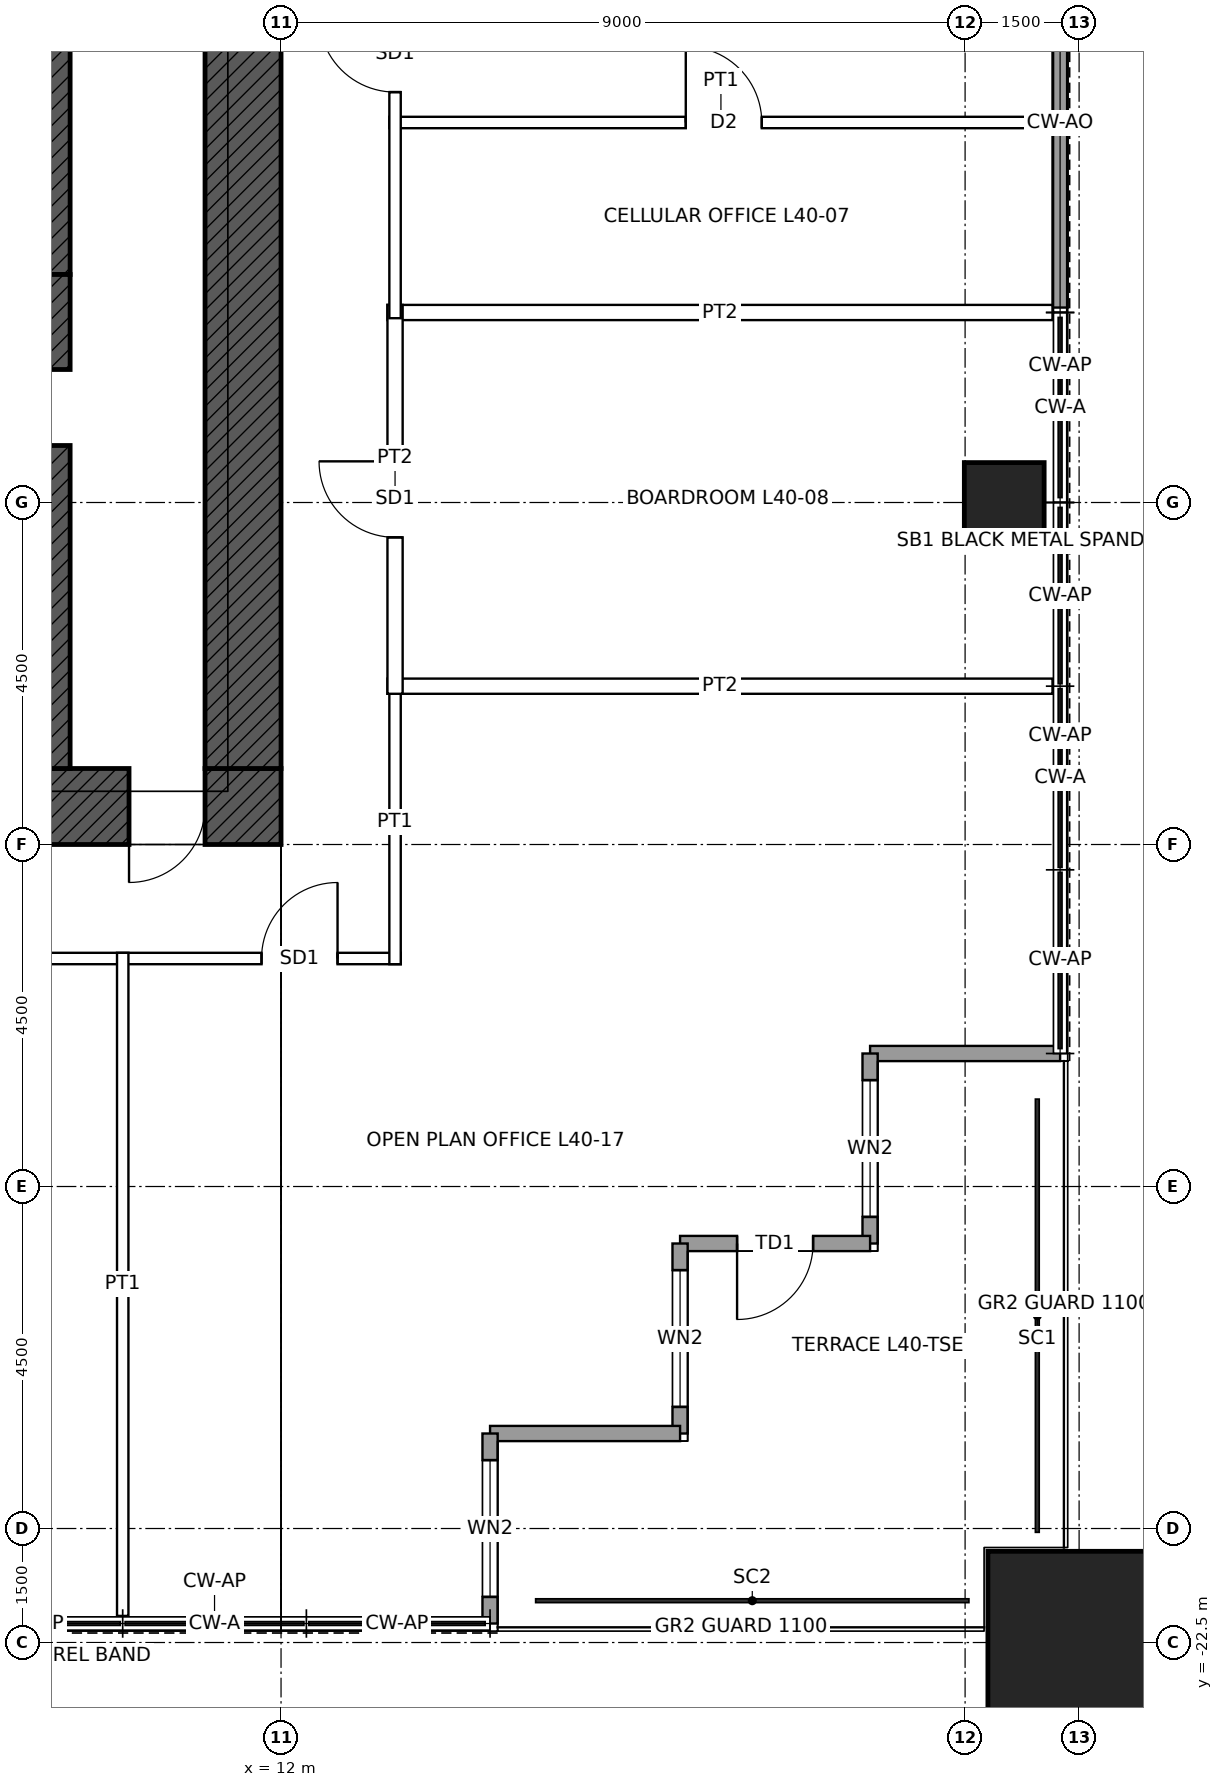
"""IFC4 building model, lengths in metres.
Left out: names, types, materials, properties, quantities, classifications, styles, units other than length and angle.
Written with IfcOpenShell. Run it as: python <this file> out.ifc"""

import sys

from ifc_helpers import new_model, si_unit, direction, frame, frame_2d, origin, origin_2d, place, context, subcontext, project, spatial, rectangle, hollow_rectangle, extrude, element, fill, save


model = new_model("IFC4")
c1 = context("Model", 3, precision=1e-05, world=origin(), true_north=direction((0.0, 1.0)))
c2 = subcontext(c1, "Body", "Model", "MODEL_VIEW")
j1 = project(units=[si_unit("LENGTHUNIT", "METRE"), si_unit("PLANEANGLEUNIT", "RADIAN")], contexts=[c1])
p1 = place(None, origin())
s1 = spatial("IfcSite", under=j1, at=p1, CompositionType="ELEMENT")
p2 = place(p1, origin())
s2 = spatial("IfcBuilding", under=s1, at=p2, CompositionType="ELEMENT")
p3 = place(p2, frame((0.0, 0.0, 193.9)))
s3 = spatial("IfcBuildingStorey", under=s2, at=p3, CompositionType="ELEMENT", Elevation=193.9)
p4 = place(p3, frame((22.5, -22.5, 0.0), z_axis=(0.0, 0.0, 1.0), x_axis=(1.0, 0.0, 0.0)))
e1 = element("IfcColumn", 1, at=p4, inside=s3, PredefinedType="COLUMN", context=c2, shape_type="SweptSolid", body=[
    extrude(hollow_rectangle(XDim=2.4, YDim=2.4, WallThickness=0.12, at=origin_2d()), origin(), (0.0, 0.0, 1.0), 4.0),
])
p5 = place(p3, frame((21.515, -7.5, 0.0), z_axis=(0.0, 0.0, 1.0), x_axis=(1.0, 0.0, 0.0)))
e2 = element("IfcColumn", 2, at=p5, inside=s3, PredefinedType="COLUMN", context=c2, shape_type="SweptSolid", body=[
    extrude(hollow_rectangle(XDim=1.05, YDim=1.05, WallThickness=0.07, at=origin_2d()), origin(), (0.0, 0.0, 1.0), 4.0),
])
p6 = place(p3, frame((12.0, -11.5, 0.0), z_axis=(0.0, 0.0, 1.0), x_axis=(-1.0, 0.0, 0.0)))
e3 = element("IfcWall", 3, at=p6, inside=s3, PredefinedType="SHEAR", context=c2, shape_type="SweptSolid", body=[
    extrude(rectangle(XDim=24.0, YDim=1.0, at=frame_2d((12.0, 0.0))), origin(), (0.0, 0.0, 1.0), 4.0),
])
p7 = place(p6, frame((11.5, 0.0, 0.0)))
e4 = element("IfcOpeningElement", 4, at=p7, cuts=e3, PredefinedType="OPENING", context=c2, shape_type="SweptSolid", body=[
    extrude(rectangle(XDim=1.0, YDim=2.1, at=frame_2d((0.5, 1.05))), frame((0.0, 0.51, 0.0), z_axis=(0.0, -1.0, 0.0), x_axis=(1.0, 0.0, 0.0)), (0.0, 0.0, 1.0), 1.02),
])
p8 = place(p6, frame((1.0, 0.0, 0.0)))
e5 = element("IfcOpeningElement", 5, at=p8, cuts=e3, PredefinedType="OPENING", context=c2, shape_type="SweptSolid", body=[
    extrude(rectangle(XDim=1.0, YDim=2.4, at=frame_2d((0.5, 1.2))), frame((0.0, 0.51, 0.0), z_axis=(0.0, -1.0, 0.0), x_axis=(1.0, 0.0, 0.0)), (0.0, 0.0, 1.0), 1.02),
])
p9 = place(p3, frame((11.5, 11.0, 0.0), z_axis=(0.0, 0.0, 1.0), x_axis=(0.0, -1.0, 0.0)))
e6 = element("IfcWall", 6, at=p9, inside=s3, PredefinedType="SHEAR", context=c2, shape_type="SweptSolid", body=[
    extrude(rectangle(XDim=22.0, YDim=1.0, at=frame_2d((11.0, 0.0))), origin(), (0.0, 0.0, 1.0), 4.0),
])
p10 = place(p9, frame((10.5, 0.0, 0.0)))
e7 = element("IfcOpeningElement", 7, at=p10, cuts=e6, PredefinedType="OPENING", context=c2, shape_type="SweptSolid", body=[
    extrude(rectangle(XDim=1.0, YDim=2.4, at=frame_2d((0.5, 1.2))), frame((0.0, 0.51, 0.0), z_axis=(0.0, -1.0, 0.0), x_axis=(1.0, 0.0, 0.0)), (0.0, 0.0, 1.0), 1.02),
])
p11 = place(p3, frame((-9.0, -1.5, 0.0), z_axis=(0.0, 0.0, 1.0), x_axis=(1.0, 0.0, 0.0)))
e8 = element("IfcWall", 8, at=p11, inside=s3, PredefinedType="SHEAR", context=c2, shape_type="SweptSolid", body=[
    extrude(rectangle(XDim=18.0, YDim=0.45, at=frame_2d((9.0, 0.0))), origin(), (0.0, 0.0, 1.0), 4.0),
])
p12 = place(p11, frame((0.95, 0.0, 0.0)))
e9 = element("IfcOpeningElement", 9, at=p12, cuts=e8, PredefinedType="OPENING", context=c2, shape_type="SweptSolid", body=[
    extrude(rectangle(XDim=1.1, YDim=2.1, at=frame_2d((0.55, 1.05))), frame((0.0, 0.235, 0.0), z_axis=(0.0, -1.0, 0.0), x_axis=(1.0, 0.0, 0.0)), (0.0, 0.0, 1.0), 0.47),
])
p13 = place(p11, frame((3.95, 0.0, 0.0)))
e10 = element("IfcOpeningElement", 10, at=p13, cuts=e8, PredefinedType="OPENING", context=c2, shape_type="SweptSolid", body=[
    extrude(rectangle(XDim=1.1, YDim=2.1, at=frame_2d((0.55, 1.05))), frame((0.0, 0.235, 0.0), z_axis=(0.0, -1.0, 0.0), x_axis=(1.0, 0.0, 0.0)), (0.0, 0.0, 1.0), 0.47),
])
p14 = place(p11, frame((6.95, 0.0, 0.0)))
e11 = element("IfcOpeningElement", 11, at=p14, cuts=e8, PredefinedType="OPENING", context=c2, shape_type="SweptSolid", body=[
    extrude(rectangle(XDim=1.1, YDim=2.1, at=frame_2d((0.55, 1.05))), frame((0.0, 0.235, 0.0), z_axis=(0.0, -1.0, 0.0), x_axis=(1.0, 0.0, 0.0)), (0.0, 0.0, 1.0), 0.47),
])
p15 = place(p3, frame((-9.0, -4.5, 0.0), z_axis=(0.0, 0.0, 1.0), x_axis=(1.0, 0.0, 0.0)))
e12 = element("IfcWall", 12, at=p15, inside=s3, PredefinedType="SHEAR", context=c2, shape_type="SweptSolid", body=[
    extrude(rectangle(XDim=18.0, YDim=0.45, at=frame_2d((9.0, 0.0))), origin(), (0.0, 0.0, 1.0), 4.0),
])
p16 = place(p3, frame((9.0, -4.5, 0.0), z_axis=(0.0, 0.0, 1.0), x_axis=(0.0, 1.0, 0.0)))
e13 = element("IfcWall", 13, at=p16, inside=s3, PredefinedType="SHEAR", context=c2, shape_type="SweptSolid", body=[
    extrude(rectangle(XDim=3.0, YDim=0.45, at=frame_2d((1.5, 0.0))), origin(), (0.0, 0.0, 1.0), 4.0),
])
p17 = place(p3, frame((9.0, -11.0, 0.0), z_axis=(0.0, 0.0, 1.0), x_axis=(0.0, 1.0, 0.0)))
e14 = element("IfcWall", 14, at=p17, inside=s3, PredefinedType="SHEAR", context=c2, shape_type="SweptSolid", body=[
    extrude(rectangle(XDim=6.5, YDim=0.45, at=frame_2d((3.25, 0.0))), origin(), (0.0, 0.0, 1.0), 4.0),
])
p18 = place(p17, frame((4.25, 0.0, 0.0)))
e15 = element("IfcOpeningElement", 15, at=p18, cuts=e14, PredefinedType="OPENING", context=c2, shape_type="SweptSolid", body=[
    extrude(rectangle(XDim=1.0, YDim=2.1, at=frame_2d((0.5, 1.05))), frame((0.0, 0.235, 0.0), z_axis=(0.0, -1.0, 0.0), x_axis=(1.0, 0.0, 0.0)), (0.0, 0.0, 1.0), 0.47),
])
p19 = place(p3, frame((22.25, -14.75, 0.0), z_axis=(0.0, 0.0, 1.0), x_axis=(-1.0, 0.0, 0.0)))
e16 = element("IfcWall", 16, at=p19, inside=s3, PredefinedType="SOLIDWALL", context=c2, shape_type="SweptSolid", body=[
    extrude(rectangle(XDim=2.5, YDim=0.2, at=frame_2d((1.25, 0.0))), origin(), (0.0, 0.0, 1.0), 3.85),
])
p20 = place(p3, frame((19.75, -14.75, 0.0), z_axis=(0.0, 0.0, 1.0), x_axis=(0.0, -1.0, 0.0)))
e17 = element("IfcWall", 17, at=p20, inside=s3, PredefinedType="SOLIDWALL", context=c2, shape_type="SweptSolid", body=[
    extrude(rectangle(XDim=2.5, YDim=0.2, at=frame_2d((1.25, 0.0))), origin(), (0.0, 0.0, 1.0), 3.85),
])
p21 = place(p20, frame((0.35, 0.0, 0.3)))
e18 = element("IfcOpeningElement", 18, at=p21, cuts=e17, PredefinedType="OPENING", context=c2, shape_type="SweptSolid", body=[
    extrude(rectangle(XDim=1.8, YDim=2.4, at=frame_2d((0.9, 1.2))), frame((0.0, 0.11, 0.0), z_axis=(0.0, -1.0, 0.0), x_axis=(1.0, 0.0, 0.0)), (0.0, 0.0, 1.0), 0.22),
])
p22 = place(p3, frame((19.75, -17.25, 0.0), z_axis=(0.0, 0.0, 1.0), x_axis=(-1.0, 0.0, 0.0)))
e19 = element("IfcWall", 19, at=p22, inside=s3, PredefinedType="SOLIDWALL", context=c2, shape_type="SweptSolid", body=[
    extrude(rectangle(XDim=2.5, YDim=0.2, at=frame_2d((1.25, 0.0))), origin(), (0.0, 0.0, 1.0), 3.85),
])
p23 = place(p22, frame((0.75, 0.0, 0.0)))
e20 = element("IfcOpeningElement", 20, at=p23, cuts=e19, PredefinedType="OPENING", context=c2, shape_type="SweptSolid", body=[
    extrude(rectangle(XDim=1.0, YDim=2.4, at=frame_2d((0.5, 1.2))), frame((0.0, 0.11, 0.0), z_axis=(0.0, -1.0, 0.0), x_axis=(1.0, 0.0, 0.0)), (0.0, 0.0, 1.0), 0.22),
])
p24 = place(p3, frame((17.25, -17.25, 0.0), z_axis=(0.0, 0.0, 1.0), x_axis=(0.0, -1.0, 0.0)))
e21 = element("IfcWall", 21, at=p24, inside=s3, PredefinedType="SOLIDWALL", context=c2, shape_type="SweptSolid", body=[
    extrude(rectangle(XDim=2.5, YDim=0.2, at=frame_2d((1.25, 0.0))), origin(), (0.0, 0.0, 1.0), 3.85),
])
p25 = place(p24, frame((0.35, 0.0, 0.3)))
e22 = element("IfcOpeningElement", 22, at=p25, cuts=e21, PredefinedType="OPENING", context=c2, shape_type="SweptSolid", body=[
    extrude(rectangle(XDim=1.8, YDim=2.4, at=frame_2d((0.9, 1.2))), frame((0.0, 0.11, 0.0), z_axis=(0.0, -1.0, 0.0), x_axis=(1.0, 0.0, 0.0)), (0.0, 0.0, 1.0), 0.22),
])
p26 = place(p3, frame((17.25, -19.75, 0.0), z_axis=(0.0, 0.0, 1.0), x_axis=(-1.0, 0.0, 0.0)))
e23 = element("IfcWall", 23, at=p26, inside=s3, PredefinedType="SOLIDWALL", context=c2, shape_type="SweptSolid", body=[
    extrude(rectangle(XDim=2.5, YDim=0.2, at=frame_2d((1.25, 0.0))), origin(), (0.0, 0.0, 1.0), 3.85),
])
p27 = place(p3, frame((14.75, -19.75, 0.0), z_axis=(0.0, 0.0, 1.0), x_axis=(0.0, -1.0, 0.0)))
e24 = element("IfcWall", 24, at=p27, inside=s3, PredefinedType="SOLIDWALL", context=c2, shape_type="SweptSolid", body=[
    extrude(rectangle(XDim=2.5, YDim=0.2, at=frame_2d((1.25, 0.0))), origin(), (0.0, 0.0, 1.0), 3.85),
])
p28 = place(p27, frame((0.35, 0.0, 0.3)))
e25 = element("IfcOpeningElement", 25, at=p28, cuts=e24, PredefinedType="OPENING", context=c2, shape_type="SweptSolid", body=[
    extrude(rectangle(XDim=1.8, YDim=2.4, at=frame_2d((0.9, 1.2))), frame((0.0, 0.11, 0.0), z_axis=(0.0, -1.0, 0.0), x_axis=(1.0, 0.0, 0.0)), (0.0, 0.0, 1.0), 0.22),
])
for number, where, z_axis, x_axis in (
    (26, (22.25, -0.065, 0.0), (0.0, 0.0, 1.0), (0.0, -1.0, 0.0)),
    (27, (22.25, -2.532, 0.0), (0.0, 0.0, 1.0), (0.0, -1.0, 0.0)),
):
    element("IfcWall", number, at=place(p3, frame(where, z_axis=z_axis, x_axis=x_axis)), inside=s3, PredefinedType="SOLIDWALL", context=c2, shape_type="SweptSolid", body=[
        extrude(rectangle(XDim=2.403, YDim=0.2, at=frame_2d((1.201, 0.0))), origin(), (0.0, 0.0, 1.0), 3.85),
    ])
p29 = place(p3, frame((-13.575, -13.5, 0.0), z_axis=(0.0, 0.0, 1.0), x_axis=(1.0, 0.0, 0.0)))
e28 = element("IfcWall", 28, at=p29, inside=s3, PredefinedType="PARTITIONING", context=c2, shape_type="SweptSolid", body=[
    extrude(rectangle(XDim=27.15, YDim=0.15, at=frame_2d((13.575, 0.0))), origin(), (0.0, 0.0, 1.0), 3.85),
])
p30 = place(p29, frame((19.283, 0.0, 0.0)))
e29 = element("IfcOpeningElement", 29, at=p30, cuts=e28, PredefinedType="OPENING", context=c2, shape_type="SweptSolid", body=[
    extrude(rectangle(XDim=1.0, YDim=2.4, at=frame_2d((0.5, 1.2))), frame((0.0, 0.085, 0.0), z_axis=(0.0, -1.0, 0.0), x_axis=(1.0, 0.0, 0.0)), (0.0, 0.0, 1.0), 0.17),
])
p31 = place(p29, frame((9.325, 0.0, 0.0)))
e30 = element("IfcOpeningElement", 30, at=p31, cuts=e28, PredefinedType="OPENING", context=c2, shape_type="SweptSolid", body=[
    extrude(rectangle(XDim=1.0, YDim=2.1, at=frame_2d((0.5, 1.05))), frame((0.0, 0.085, 0.0), z_axis=(0.0, -1.0, 0.0), x_axis=(1.0, 0.0, 0.0)), (0.0, 0.0, 1.0), 0.17),
])
p32 = place(p29, frame((3.825, 0.0, 0.0)))
e31 = element("IfcOpeningElement", 31, at=p32, cuts=e28, PredefinedType="OPENING", context=c2, shape_type="SweptSolid", body=[
    extrude(rectangle(XDim=1.0, YDim=2.4, at=frame_2d((0.5, 1.2))), frame((0.0, 0.085, 0.0), z_axis=(0.0, -1.0, 0.0), x_axis=(1.0, 0.0, 0.0)), (0.0, 0.0, 1.0), 0.17),
])
p33 = place(p29, frame((25.318, 0.0, 0.0)))
e32 = element("IfcOpeningElement", 32, at=p33, cuts=e28, PredefinedType="OPENING", context=c2, shape_type="SweptSolid", body=[
    extrude(rectangle(XDim=1.0, YDim=2.4, at=frame_2d((0.5, 1.2))), frame((0.0, 0.085, 0.0), z_axis=(0.0, -1.0, 0.0), x_axis=(1.0, 0.0, 0.0)), (0.0, 0.0, 1.0), 0.17),
])
for number, where, z_axis, x_axis in (
    (33, (13.4, -9.917, 0.0), (0.0, 0.0, 1.0), (1.0, 0.0, 0.0)),
    (34, (13.4, -5.0, 0.0), (0.0, 0.0, 1.0), (1.0, 0.0, 0.0)),
):
    element("IfcWall", number, at=place(p3, frame(where, z_axis=z_axis, x_axis=x_axis)), inside=s3, PredefinedType="PARTITIONING", context=c2, shape_type="SweptSolid", body=[
        extrude(rectangle(XDim=8.75, YDim=0.2, at=frame_2d((4.375, 0.0))), origin(), (0.0, 0.0, 1.0), 3.85),
    ])
p34 = place(p3, frame((13.425, -2.5, 0.0), z_axis=(0.0, 0.0, 1.0), x_axis=(1.0, 0.0, 0.0)))
e35 = element("IfcWall", 35, at=p34, inside=s3, PredefinedType="PARTITIONING", context=c2, shape_type="SweptSolid", body=[
    extrude(rectangle(XDim=8.725, YDim=0.15, at=frame_2d((4.362, 0.0))), origin(), (0.0, 0.0, 1.0), 3.85),
])
p35 = place(p34, frame((3.9, 0.0, 0.0)))
e36 = element("IfcOpeningElement", 36, at=p35, cuts=e35, PredefinedType="OPENING", context=c2, shape_type="SweptSolid", body=[
    extrude(rectangle(XDim=1.0, YDim=2.1, at=frame_2d((0.5, 1.05))), frame((0.0, 0.085, 0.0), z_axis=(0.0, -1.0, 0.0), x_axis=(1.0, 0.0, 0.0)), (0.0, 0.0, 1.0), 0.17),
])
p36 = place(p3, frame((9.917, -22.15, 0.0), z_axis=(0.0, 0.0, 1.0), x_axis=(0.0, 1.0, 0.0)))
e37 = element("IfcWall", 37, at=p36, inside=s3, PredefinedType="PARTITIONING", context=c2, shape_type="SweptSolid", body=[
    extrude(rectangle(XDim=8.725, YDim=0.15, at=frame_2d((4.362, 0.0))), origin(), (0.0, 0.0, 1.0), 3.85),
])
p37 = place(p3, frame((13.5, -13.575, 0.0), z_axis=(0.0, 0.0, 1.0), x_axis=(0.0, 1.0, 0.0)))
e38 = element("IfcWall", 38, at=p37, inside=s3, PredefinedType="PARTITIONING", context=c2, shape_type="SweptSolid", body=[
    extrude(rectangle(XDim=3.733, YDim=0.15, at=frame_2d((1.866, 0.0))), origin(), (0.0, 0.0, 1.0), 3.85),
])
p38 = place(p3, frame((13.5, -10.017, 0.0), z_axis=(0.0, 0.0, 1.0), x_axis=(0.0, 1.0, 0.0)))
e39 = element("IfcWall", 39, at=p38, inside=s3, PredefinedType="PARTITIONING", context=c2, shape_type="SweptSolid", body=[
    extrude(rectangle(XDim=5.117, YDim=0.2, at=frame_2d((2.559, 0.0))), origin(), (0.0, 0.0, 1.0), 3.85),
])
p39 = place(p38, frame((2.059, 0.0, 0.0)))
e40 = element("IfcOpeningElement", 40, at=p39, cuts=e39, PredefinedType="OPENING", context=c2, shape_type="SweptSolid", body=[
    extrude(rectangle(XDim=1.0, YDim=2.4, at=frame_2d((0.5, 1.2))), frame((0.0, 0.11, 0.0), z_axis=(0.0, -1.0, 0.0), x_axis=(1.0, 0.0, 0.0)), (0.0, 0.0, 1.0), 0.22),
])
p40 = place(p3, frame((13.5, -5.075, 0.0), z_axis=(0.0, 0.0, 1.0), x_axis=(0.0, 1.0, 0.0)))
e41 = element("IfcWall", 41, at=p40, inside=s3, PredefinedType="PARTITIONING", context=c2, shape_type="SweptSolid", body=[
    extrude(rectangle(XDim=17.15, YDim=0.15, at=frame_2d((8.575, 0.0))), origin(), (0.0, 0.0, 1.0), 3.85),
])
p41 = place(p40, frame((2.975, 0.0, 0.0)))
e42 = element("IfcOpeningElement", 42, at=p41, cuts=e41, PredefinedType="OPENING", context=c2, shape_type="SweptSolid", body=[
    extrude(rectangle(XDim=1.0, YDim=2.4, at=frame_2d((0.5, 1.2))), frame((0.0, 0.085, 0.0), z_axis=(0.0, -1.0, 0.0), x_axis=(1.0, 0.0, 0.0)), (0.0, 0.0, 1.0), 0.17),
])
p42 = place(p40, frame((15.533, 0.0, 0.0)))
e43 = element("IfcOpeningElement", 43, at=p42, cuts=e41, PredefinedType="OPENING", context=c2, shape_type="SweptSolid", body=[
    extrude(rectangle(XDim=1.0, YDim=2.4, at=frame_2d((0.5, 1.2))), frame((0.0, 0.085, 0.0), z_axis=(0.0, -1.0, 0.0), x_axis=(1.0, 0.0, 0.0)), (0.0, 0.0, 1.0), 0.17),
])
p43 = place(p21, origin())
e44 = element("IfcWindow", 44, at=p43, inside=s3, PartitioningType="SINGLE_PANEL", PredefinedType="WINDOW", context=c2, shape_type="SweptSolid", body=[
    extrude(rectangle(XDim=1.8, YDim=2.4, at=frame_2d((0.9, 1.2))), frame((0.0, 0.03, 0.0), z_axis=(0.0, -1.0, 0.0), x_axis=(1.0, 0.0, 0.0)), (0.0, 0.0, 1.0), 0.06),
])
fill(e18, e44)
p44 = place(p23, origin())
e45 = element("IfcDoor", 45, at=p44, inside=s3, OperationType="SINGLE_SWING_RIGHT", PredefinedType="DOOR", context=c2, shape_type="SweptSolid", body=[
    extrude(rectangle(XDim=1.0, YDim=2.4, at=frame_2d((0.5, 1.2))), frame((0.0, 0.025, 0.0), z_axis=(0.0, -1.0, 0.0), x_axis=(1.0, 0.0, 0.0)), (0.0, 0.0, 1.0), 0.05),
])
fill(e20, e45)
p45 = place(p25, origin())
e46 = element("IfcWindow", 46, at=p45, inside=s3, PartitioningType="SINGLE_PANEL", PredefinedType="WINDOW", context=c2, shape_type="SweptSolid", body=[
    extrude(rectangle(XDim=1.8, YDim=2.4, at=frame_2d((0.9, 1.2))), frame((0.0, 0.03, 0.0), z_axis=(0.0, -1.0, 0.0), x_axis=(1.0, 0.0, 0.0)), (0.0, 0.0, 1.0), 0.06),
])
fill(e22, e46)
p46 = place(p28, origin())
e47 = element("IfcWindow", 47, at=p46, inside=s3, PartitioningType="SINGLE_PANEL", PredefinedType="WINDOW", context=c2, shape_type="SweptSolid", body=[
    extrude(rectangle(XDim=1.8, YDim=2.4, at=frame_2d((0.9, 1.2))), frame((0.0, 0.03, 0.0), z_axis=(0.0, -1.0, 0.0), x_axis=(1.0, 0.0, 0.0)), (0.0, 0.0, 1.0), 0.06),
])
fill(e25, e47)
p47 = place(p8, origin())
e48 = element("IfcDoor", 48, at=p47, inside=s3, OperationType="SINGLE_SWING_RIGHT", PredefinedType="DOOR", context=c2, shape_type="SweptSolid", body=[
    extrude(rectangle(XDim=1.0, YDim=2.4, at=frame_2d((0.5, 1.2))), frame((0.0, 0.485, 0.0), z_axis=(0.0, -1.0, 0.0), x_axis=(1.0, 0.0, 0.0)), (0.0, 0.0, 1.0), 0.05),
])
fill(e5, e48)
p48 = place(p18, origin())
e49 = element("IfcDoor", 49, at=p48, inside=s3, OperationType="SINGLE_SWING_LEFT", PredefinedType="DOOR", context=c2, shape_type="SweptSolid", body=[
    extrude(rectangle(XDim=1.0, YDim=2.1, at=frame_2d((0.5, 1.05))), frame((0.0, 0.025, 0.0), z_axis=(0.0, -1.0, 0.0), x_axis=(1.0, 0.0, 0.0)), (0.0, 0.0, 1.0), 0.05),
])
fill(e15, e49)
p49 = place(p41, origin())
e50 = element("IfcDoor", 50, at=p49, inside=s3, OperationType="SINGLE_SWING_RIGHT", PredefinedType="DOOR", context=c2, shape_type="SweptSolid", body=[
    extrude(rectangle(XDim=1.0, YDim=2.4, at=frame_2d((0.5, 1.2))), frame((0.0, 0.025, 0.0), z_axis=(0.0, -1.0, 0.0), x_axis=(1.0, 0.0, 0.0)), (0.0, 0.0, 1.0), 0.05),
])
fill(e42, e50)
p50 = place(p35, origin())
e51 = element("IfcDoor", 51, at=p50, inside=s3, OperationType="SINGLE_SWING_LEFT", PredefinedType="DOOR", context=c2, shape_type="SweptSolid", body=[
    extrude(rectangle(XDim=1.0, YDim=2.1, at=frame_2d((0.5, 1.05))), frame((0.0, 0.025, 0.0), z_axis=(0.0, -1.0, 0.0), x_axis=(1.0, 0.0, 0.0)), (0.0, 0.0, 1.0), 0.05),
])
fill(e36, e51)
p51 = place(p39, origin())
e52 = element("IfcDoor", 52, at=p51, inside=s3, OperationType="SINGLE_SWING_RIGHT", PredefinedType="DOOR", context=c2, shape_type="SweptSolid", body=[
    extrude(rectangle(XDim=1.0, YDim=2.4, at=frame_2d((0.5, 1.2))), frame((0.0, 0.025, 0.0), z_axis=(0.0, -1.0, 0.0), x_axis=(1.0, 0.0, 0.0)), (0.0, 0.0, 1.0), 0.05),
])
fill(e40, e52)
p52 = place(p33, origin())
e53 = element("IfcDoor", 53, at=p52, inside=s3, OperationType="SINGLE_SWING_RIGHT", PredefinedType="DOOR", context=c2, shape_type="SweptSolid", body=[
    extrude(rectangle(XDim=1.0, YDim=2.4, at=frame_2d((0.5, 1.2))), frame((0.0, 0.025, 0.0), z_axis=(0.0, -1.0, 0.0), x_axis=(1.0, 0.0, 0.0)), (0.0, 0.0, 1.0), 0.05),
])
fill(e32, e53)
save(model, sys.argv[1])
